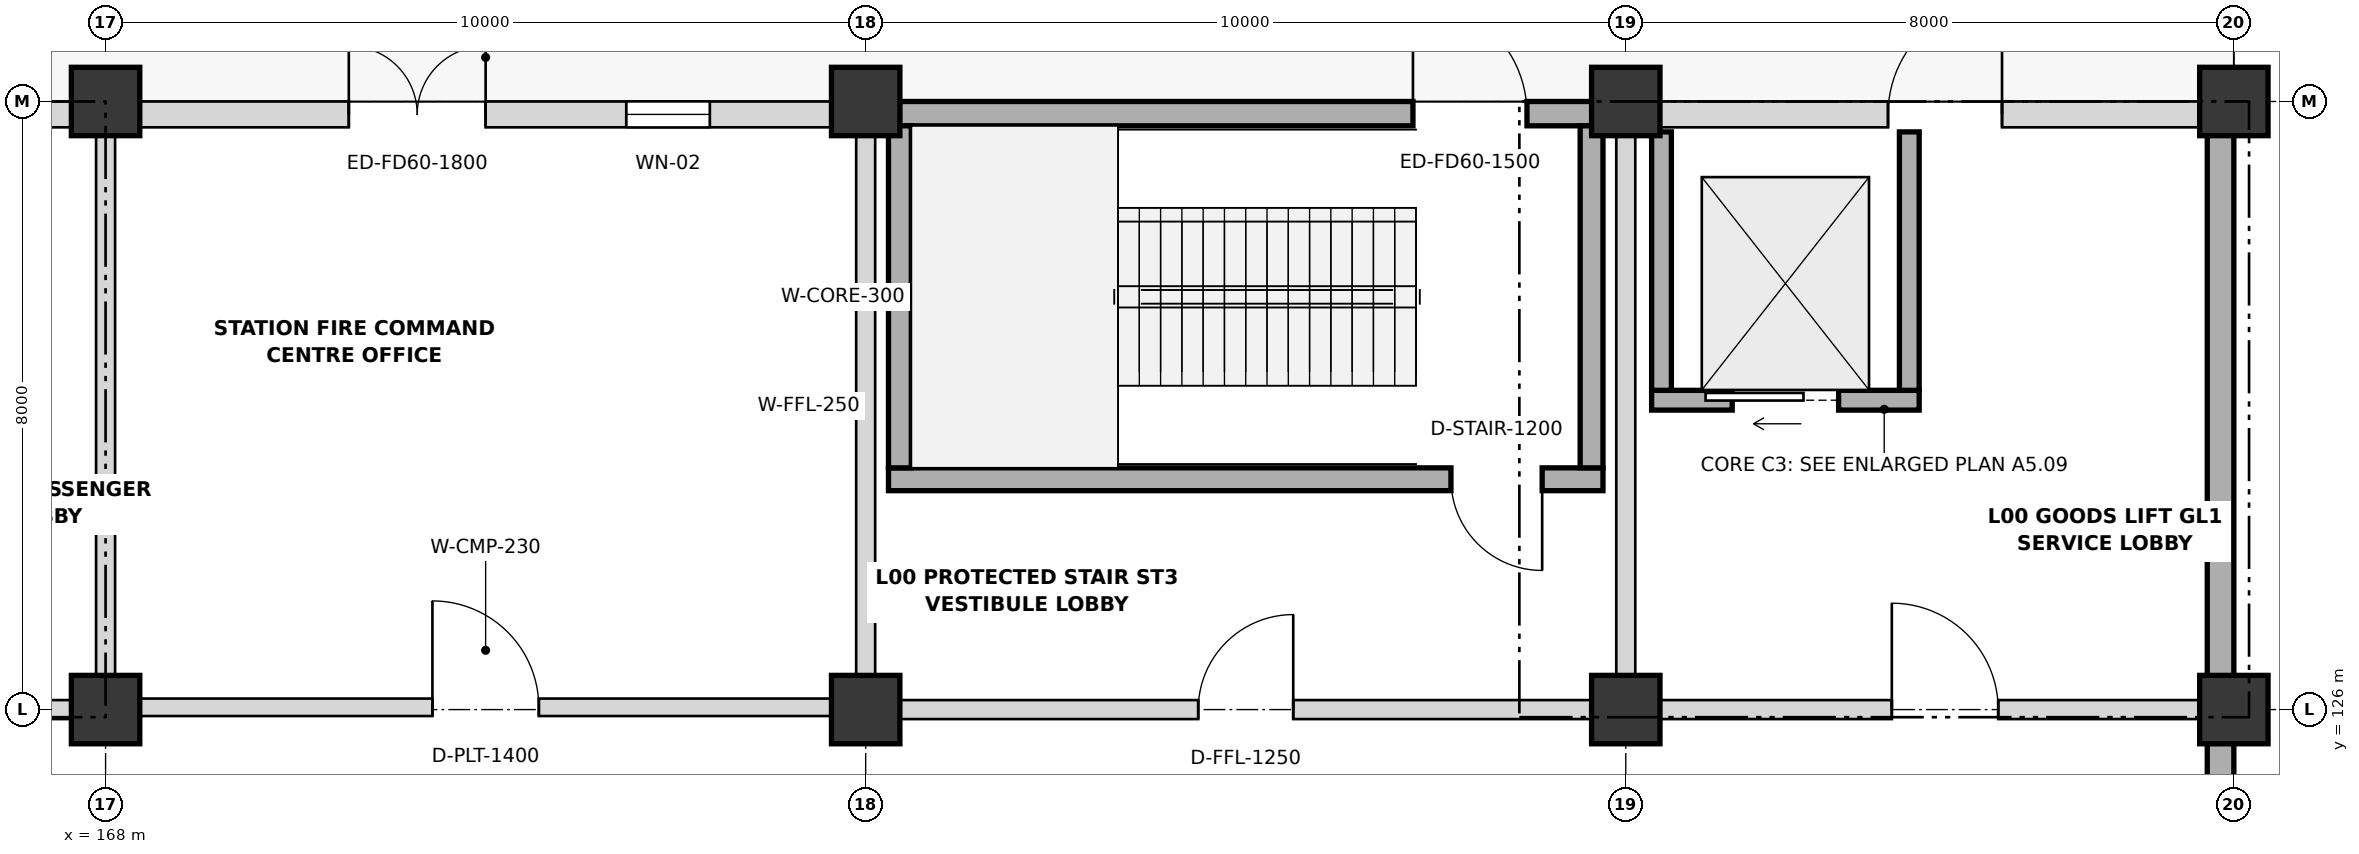
"""IFC4 building model, lengths in metres.
Left out: names, types, materials, properties, quantities, classifications, styles, units other than length and angle.
Written with IfcOpenShell. Run it as: python <this file> out.ifc"""

import sys

from ifc_helpers import new_model, si_unit, direction, frame, frame_2d, origin, origin_2d, place, context, subcontext, project, spatial, rectangle, extrude, element, fill, save


model = new_model("IFC4")
c1 = context("Model", 3, precision=1e-05, world=origin(), true_north=direction((0.0, 1.0)))
c2 = subcontext(c1, "Body", "Model", "MODEL_VIEW")
j1 = project(units=[si_unit("LENGTHUNIT", "METRE"), si_unit("PLANEANGLEUNIT", "RADIAN")], contexts=[c1])
p1 = place(None, origin())
s1 = spatial("IfcSite", under=j1, at=p1, CompositionType="ELEMENT")
p2 = place(p1, origin())
s2 = spatial("IfcBuilding", under=s1, at=p2, CompositionType="ELEMENT")
p3 = place(p2, origin())
s3 = spatial("IfcBuildingStorey", under=s2, at=p3, CompositionType="ELEMENT", Elevation=0.0)
for number, where, z_axis, x_axis in (
    (1, (168.0, 126.0, 0.0), (0.0, 0.0, 1.0), (1.0, 0.0, 0.0)),
    (2, (168.0, 134.0, 0.0), (0.0, 0.0, 1.0), (1.0, 0.0, 0.0)),
    (3, (178.0, 126.0, 0.0), (0.0, 0.0, 1.0), (1.0, 0.0, 0.0)),
    (4, (178.0, 134.0, 0.0), (0.0, 0.0, 1.0), (1.0, 0.0, 0.0)),
    (5, (188.0, 126.0, 0.0), (0.0, 0.0, 1.0), (1.0, 0.0, 0.0)),
    (6, (188.0, 134.0, 0.0), (0.0, 0.0, 1.0), (1.0, 0.0, 0.0)),
    (7, (196.0, 126.0, 0.0), (0.0, 0.0, 1.0), (1.0, 0.0, 0.0)),
    (8, (196.0, 134.0, 0.0), (0.0, 0.0, 1.0), (1.0, 0.0, 0.0)),
):
    element("IfcColumn", number, at=place(p3, frame(where, z_axis=z_axis, x_axis=x_axis)), inside=s3, PredefinedType="COLUMN", context=c2, shape_type="SweptSolid", body=[
        extrude(rectangle(XDim=0.9, YDim=0.9, at=origin_2d()), origin(), (0.0, 0.0, 1.0), 5.4),
    ])
p4 = place(p3, frame((195.825, 125.555, 0.0), z_axis=(0.0, 0.0, 1.0), x_axis=(0.0, -1.0, 0.0)))
e9 = element("IfcWall", 9, at=p4, inside=s3, PredefinedType="SOLIDWALL", context=c2, shape_type="SweptSolid", body=[
    extrude(rectangle(XDim=11.11, YDim=0.35, at=frame_2d((5.555, 0.0))), origin(), (0.0, 0.0, 1.0), 5.4),
])
p5 = place(p3, frame((195.825, 133.555, 0.0), z_axis=(0.0, 0.0, 1.0), x_axis=(0.0, -1.0, 0.0)))
e10 = element("IfcWall", 10, at=p5, inside=s3, PredefinedType="SOLIDWALL", context=c2, shape_type="SweptSolid", body=[
    extrude(rectangle(XDim=7.11, YDim=0.35, at=frame_2d((3.555, 0.0))), origin(), (0.0, 0.0, 1.0), 5.4),
])
p6 = place(p3, frame((158.445, 133.83, 0.0), z_axis=(0.0, 0.0, 1.0), x_axis=(1.0, 0.0, 0.0)))
e11 = element("IfcWall", 11, at=p6, inside=s3, PredefinedType="SOLIDWALL", context=c2, shape_type="SweptSolid", body=[
    extrude(rectangle(XDim=9.11, YDim=0.34, at=frame_2d((4.555, 0.0))), origin(), (0.0, 0.0, 1.0), 4.358),
])
p7 = place(p6, frame((6.005, 0.0, 0.0)))
e12 = element("IfcOpeningElement", 12, at=p7, cuts=e11, PredefinedType="OPENING", context=c2, shape_type="SweptSolid", body=[
    extrude(rectangle(XDim=1.5, YDim=2.25, at=frame_2d((0.75, 1.125))), frame((0.0, 0.18, 0.0), z_axis=(0.0, -1.0, 0.0), x_axis=(1.0, 0.0, 0.0)), (0.0, 0.0, 1.0), 0.36),
])
p8 = place(p3, frame((168.445, 133.83, 0.0), z_axis=(0.0, 0.0, 1.0), x_axis=(1.0, 0.0, 0.0)))
e13 = element("IfcWall", 13, at=p8, inside=s3, PredefinedType="SOLIDWALL", context=c2, shape_type="SweptSolid", body=[
    extrude(rectangle(XDim=9.11, YDim=0.34, at=frame_2d((4.555, 0.0))), origin(), (0.0, 0.0, 1.0), 4.358),
])
p9 = place(p8, frame((2.755, 0.0, 0.0)))
e14 = element("IfcOpeningElement", 14, at=p9, cuts=e13, PredefinedType="OPENING", context=c2, shape_type="SweptSolid", body=[
    extrude(rectangle(XDim=1.8, YDim=2.25, at=frame_2d((0.9, 1.125))), frame((0.0, 0.18, 0.0), z_axis=(0.0, -1.0, 0.0), x_axis=(1.0, 0.0, 0.0)), (0.0, 0.0, 1.0), 0.36),
])
p10 = place(p8, frame((6.405, 0.0, 1.15)))
e15 = element("IfcOpeningElement", 15, at=p10, cuts=e13, PredefinedType="OPENING", context=c2, shape_type="SweptSolid", body=[
    extrude(rectangle(XDim=1.1, YDim=1.15, at=frame_2d((0.55, 0.575))), frame((0.0, 0.18, 0.0), z_axis=(0.0, -1.0, 0.0), x_axis=(1.0, 0.0, 0.0)), (0.0, 0.0, 1.0), 0.36),
])
p11 = place(p3, frame((178.445, 133.84, 0.0), z_axis=(0.0, 0.0, 1.0), x_axis=(1.0, 0.0, 0.0)))
e16 = element("IfcWall", 16, at=p11, inside=s3, PredefinedType="SHEAR", context=c2, shape_type="SweptSolid", body=[
    extrude(rectangle(XDim=9.11, YDim=0.32, at=frame_2d((4.555, 0.0))), origin(), (0.0, 0.0, 1.0), 5.4),
])
p12 = place(p11, frame((6.755, 0.0, 0.0)))
e17 = element("IfcOpeningElement", 17, at=p12, cuts=e16, PredefinedType="OPENING", context=c2, shape_type="SweptSolid", body=[
    extrude(rectangle(XDim=1.5, YDim=2.25, at=frame_2d((0.75, 1.125))), frame((0.0, 0.17, 0.0), z_axis=(0.0, -1.0, 0.0), x_axis=(1.0, 0.0, 0.0)), (0.0, 0.0, 1.0), 0.34),
])
p13 = place(p3, frame((188.445, 133.83, 0.0), z_axis=(0.0, 0.0, 1.0), x_axis=(1.0, 0.0, 0.0)))
e18 = element("IfcWall", 18, at=p13, inside=s3, PredefinedType="SOLIDWALL", context=c2, shape_type="SweptSolid", body=[
    extrude(rectangle(XDim=7.11, YDim=0.34, at=frame_2d((3.555, 0.0))), origin(), (0.0, 0.0, 1.0), 4.358),
])
p14 = place(p13, frame((3.005, 0.0, 0.0)))
e19 = element("IfcOpeningElement", 19, at=p14, cuts=e18, PredefinedType="OPENING", context=c2, shape_type="SweptSolid", body=[
    extrude(rectangle(XDim=1.5, YDim=2.25, at=frame_2d((0.75, 1.125))), frame((0.0, 0.18, 0.0), z_axis=(0.0, -1.0, 0.0), x_axis=(1.0, 0.0, 0.0)), (0.0, 0.0, 1.0), 0.36),
])
p15 = place(p3, frame((187.7, 129.03, 0.0), z_axis=(0.0, 0.0, 1.0), x_axis=(-1.0, 0.0, 0.0)))
e20 = element("IfcWall", 20, at=p15, inside=s3, PredefinedType="SHEAR", context=c2, shape_type="SweptSolid", body=[
    extrude(rectangle(XDim=9.4, YDim=0.3, at=frame_2d((4.7, 0.0))), origin(), (0.0, 0.0, 1.0), 5.4),
])
p16 = place(p15, frame((0.8, 0.0, 0.0)))
e21 = element("IfcOpeningElement", 21, at=p16, cuts=e20, PredefinedType="OPENING", context=c2, shape_type="SweptSolid", body=[
    extrude(rectangle(XDim=1.2, YDim=2.15, at=frame_2d((0.6, 1.075))), frame((0.0, 0.16, 0.0), z_axis=(0.0, -1.0, 0.0), x_axis=(1.0, 0.0, 0.0)), (0.0, 0.0, 1.0), 0.32),
])
for number, where, z_axis, x_axis in (
    (22, (187.55, 133.68, 0.0), (0.0, 0.0, 1.0), (0.0, -1.0, 0.0)),
    (23, (178.45, 129.18, 0.0), (0.0, 0.0, 1.0), (0.0, 1.0, 0.0)),
):
    element("IfcWall", number, at=place(p3, frame(where, z_axis=z_axis, x_axis=x_axis)), inside=s3, PredefinedType="SHEAR", context=c2, shape_type="SweptSolid", body=[
        extrude(rectangle(XDim=4.5, YDim=0.3, at=frame_2d((2.25, 0.0))), origin(), (0.0, 0.0, 1.0), 5.4),
    ])
p17 = place(p3, frame((188.34, 130.07, 0.0), z_axis=(0.0, 0.0, 1.0), x_axis=(1.0, 0.0, 0.0)))
e24 = element("IfcWall", 24, at=p17, inside=s3, PredefinedType="SHEAR", context=c2, shape_type="SweptSolid", body=[
    extrude(rectangle(XDim=3.52, YDim=0.26, at=frame_2d((1.76, 0.0))), origin(), (0.0, 0.0, 1.0), 5.4),
])
p18 = place(p17, frame((1.06, 0.0, 0.0)))
e25 = element("IfcOpeningElement", 25, at=p18, cuts=e24, PredefinedType="OPENING", context=c2, shape_type="SweptSolid", body=[
    extrude(rectangle(XDim=1.4, YDim=2.2, at=frame_2d((0.7, 1.1))), frame((0.0, 0.14, 0.0), z_axis=(0.0, -1.0, 0.0), x_axis=(1.0, 0.0, 0.0)), (0.0, 0.0, 1.0), 0.28),
])
for number, where, z_axis, x_axis in (
    (26, (188.47, 130.2, 0.0), (0.0, 0.0, 1.0), (0.0, 1.0, 0.0)),
    (27, (191.73, 130.2, 0.0), (0.0, 0.0, 1.0), (0.0, 1.0, 0.0)),
):
    element("IfcWall", number, at=place(p3, frame(where, z_axis=z_axis, x_axis=x_axis)), inside=s3, PredefinedType="SHEAR", context=c2, shape_type="SweptSolid", body=[
        extrude(rectangle(XDim=3.4, YDim=0.26, at=frame_2d((1.7, 0.0))), origin(), (0.0, 0.0, 1.0), 5.4),
    ])
p19 = place(p3, frame((158.455, 126.0, 0.0), z_axis=(0.0, 0.0, 1.0), x_axis=(1.0, 0.0, 0.0)))
e28 = element("IfcWall", 28, at=p19, inside=s3, PredefinedType="PARTITIONING", context=c2, shape_type="SweptSolid", body=[
    extrude(rectangle(XDim=9.09, YDim=0.25, at=frame_2d((4.545, 0.0))), origin(), (0.0, 0.0, 1.0), 4.258),
])
p20 = place(p19, frame((1.72, 0.0, 0.0)))
e29 = element("IfcOpeningElement", 29, at=p20, cuts=e28, PredefinedType="OPENING", context=c2, shape_type="SweptSolid", body=[
    extrude(rectangle(XDim=1.25, YDim=2.15, at=frame_2d((0.625, 1.075))), frame((0.0, 0.135, 0.0), z_axis=(0.0, -1.0, 0.0), x_axis=(1.0, 0.0, 0.0)), (0.0, 0.0, 1.0), 0.27),
])
p21 = place(p19, frame((6.195, 0.0, 0.0)))
e30 = element("IfcOpeningElement", 30, at=p21, cuts=e28, PredefinedType="OPENING", context=c2, shape_type="SweptSolid", body=[
    extrude(rectangle(XDim=1.1, YDim=2.15, at=frame_2d((0.55, 1.075))), frame((0.0, 0.135, 0.0), z_axis=(0.0, -1.0, 0.0), x_axis=(1.0, 0.0, 0.0)), (0.0, 0.0, 1.0), 0.27),
])
p22 = place(p3, frame((178.455, 126.0, 0.0), z_axis=(0.0, 0.0, 1.0), x_axis=(1.0, 0.0, 0.0)))
e31 = element("IfcWall", 31, at=p22, inside=s3, PredefinedType="PARTITIONING", context=c2, shape_type="SweptSolid", body=[
    extrude(rectangle(XDim=9.09, YDim=0.25, at=frame_2d((4.545, 0.0))), origin(), (0.0, 0.0, 1.0), 4.258),
])
p23 = place(p22, frame((3.92, 0.0, 0.0)))
e32 = element("IfcOpeningElement", 32, at=p23, cuts=e31, PredefinedType="OPENING", context=c2, shape_type="SweptSolid", body=[
    extrude(rectangle(XDim=1.25, YDim=2.15, at=frame_2d((0.625, 1.075))), frame((0.0, 0.135, 0.0), z_axis=(0.0, -1.0, 0.0), x_axis=(1.0, 0.0, 0.0)), (0.0, 0.0, 1.0), 0.27),
])
p24 = place(p3, frame((188.455, 126.0, 0.0), z_axis=(0.0, 0.0, 1.0), x_axis=(1.0, 0.0, 0.0)))
e33 = element("IfcWall", 33, at=p24, inside=s3, PredefinedType="PARTITIONING", context=c2, shape_type="SweptSolid", body=[
    extrude(rectangle(XDim=7.09, YDim=0.25, at=frame_2d((3.545, 0.0))), origin(), (0.0, 0.0, 1.0), 4.258),
])
p25 = place(p24, frame((3.045, 0.0, 0.0)))
e34 = element("IfcOpeningElement", 34, at=p25, cuts=e33, PredefinedType="OPENING", context=c2, shape_type="SweptSolid", body=[
    extrude(rectangle(XDim=1.4, YDim=2.2, at=frame_2d((0.7, 1.1))), frame((0.0, 0.135, 0.0), z_axis=(0.0, -1.0, 0.0), x_axis=(1.0, 0.0, 0.0)), (0.0, 0.0, 1.0), 0.27),
])
for number, where, z_axis, x_axis in (
    (35, (168.0, 126.455, 0.0), (0.0, 0.0, 1.0), (0.0, 1.0, 0.0)),
    (36, (178.0, 126.455, 0.0), (0.0, 0.0, 1.0), (0.0, 1.0, 0.0)),
    (37, (188.0, 126.455, 0.0), (0.0, 0.0, 1.0), (0.0, 1.0, 0.0)),
):
    element("IfcWall", number, at=place(p3, frame(where, z_axis=z_axis, x_axis=x_axis)), inside=s3, PredefinedType="PARTITIONING", context=c2, shape_type="SweptSolid", body=[
        extrude(rectangle(XDim=7.09, YDim=0.25, at=frame_2d((3.545, 0.0))), origin(), (0.0, 0.0, 1.0), 4.358),
    ])
p26 = place(p3, frame((168.3, 126.03, 0.0), z_axis=(0.0, 0.0, 1.0), x_axis=(1.0, 0.0, 0.0)))
e38 = element("IfcWall", 38, at=p26, inside=s3, PredefinedType="PARTITIONING", context=c2, shape_type="SweptSolid", body=[
    extrude(rectangle(XDim=9.4, YDim=0.23, at=frame_2d((4.7, 0.0))), origin(), (0.0, 0.0, 1.0), 4.258),
])
p27 = place(p26, frame((4.0, 0.0, 0.0)))
e39 = element("IfcOpeningElement", 39, at=p27, cuts=e38, PredefinedType="OPENING", context=c2, shape_type="SweptSolid", body=[
    extrude(rectangle(XDim=1.4, YDim=2.2, at=frame_2d((0.7, 1.1))), frame((0.0, 0.125, 0.0), z_axis=(0.0, -1.0, 0.0), x_axis=(1.0, 0.0, 0.0)), (0.0, 0.0, 1.0), 0.25),
])
p28 = place(p9, origin())
e40 = element("IfcDoor", 40, at=p28, inside=s3, OperationType="DOUBLE_DOOR_SINGLE_SWING", PredefinedType="DOOR", context=c2, shape_type="SweptSolid", body=[
    extrude(rectangle(XDim=1.8, YDim=2.25, at=frame_2d((0.9, 1.125))), frame((0.0, 0.025, 0.0), z_axis=(0.0, -1.0, 0.0), x_axis=(1.0, 0.0, 0.0)), (0.0, 0.0, 1.0), 0.05),
])
fill(e14, e40)
p29 = place(p10, origin())
e41 = element("IfcWindow", 41, at=p29, inside=s3, PartitioningType="SINGLE_PANEL", PredefinedType="WINDOW", context=c2, shape_type="SweptSolid", body=[
    extrude(rectangle(XDim=1.1, YDim=1.15, at=frame_2d((0.55, 0.575))), frame((0.0, 0.03, 0.0), z_axis=(0.0, -1.0, 0.0), x_axis=(1.0, 0.0, 0.0)), (0.0, 0.0, 1.0), 0.06),
])
fill(e15, e41)
p30 = place(p12, origin())
e42 = element("IfcDoor", 42, at=p30, inside=s3, OperationType="SINGLE_SWING_LEFT", PredefinedType="DOOR", context=c2, shape_type="SweptSolid", body=[
    extrude(rectangle(XDim=1.5, YDim=2.25, at=frame_2d((0.75, 1.125))), frame((0.0, 0.025, 0.0), z_axis=(0.0, -1.0, 0.0), x_axis=(1.0, 0.0, 0.0)), (0.0, 0.0, 1.0), 0.05),
])
fill(e17, e42)
p31 = place(p14, origin())
e43 = element("IfcDoor", 43, at=p31, inside=s3, OperationType="SINGLE_SWING_RIGHT", PredefinedType="DOOR", context=c2, shape_type="SweptSolid", body=[
    extrude(rectangle(XDim=1.5, YDim=2.25, at=frame_2d((0.75, 1.125))), frame((0.0, 0.025, 0.0), z_axis=(0.0, -1.0, 0.0), x_axis=(1.0, 0.0, 0.0)), (0.0, 0.0, 1.0), 0.05),
])
fill(e19, e43)
p32 = place(p16, origin())
e44 = element("IfcDoor", 44, at=p32, inside=s3, OperationType="SINGLE_SWING_LEFT", PredefinedType="DOOR", context=c2, shape_type="SweptSolid", body=[
    extrude(rectangle(XDim=1.2, YDim=2.15, at=frame_2d((0.6, 1.075))), frame((0.0, 0.025, 0.0), z_axis=(0.0, -1.0, 0.0), x_axis=(1.0, 0.0, 0.0)), (0.0, 0.0, 1.0), 0.05),
])
fill(e21, e44)
p33 = place(p18, origin())
e45 = element("IfcDoor", 45, at=p33, inside=s3, OperationType="SLIDING_TO_LEFT", PredefinedType="DOOR", context=c2, shape_type="SweptSolid", body=[
    extrude(rectangle(XDim=1.4, YDim=2.2, at=frame_2d((0.7, 1.1))), frame((0.0, 0.025, 0.0), z_axis=(0.0, -1.0, 0.0), x_axis=(1.0, 0.0, 0.0)), (0.0, 0.0, 1.0), 0.05),
])
fill(e25, e45)
p34 = place(p23, origin())
e46 = element("IfcDoor", 46, at=p34, inside=s3, OperationType="SINGLE_SWING_RIGHT", PredefinedType="DOOR", context=c2, shape_type="SweptSolid", body=[
    extrude(rectangle(XDim=1.25, YDim=2.15, at=frame_2d((0.625, 1.075))), frame((0.0, 0.025, 0.0), z_axis=(0.0, -1.0, 0.0), x_axis=(1.0, 0.0, 0.0)), (0.0, 0.0, 1.0), 0.05),
])
fill(e32, e46)
p35 = place(p25, origin())
e47 = element("IfcDoor", 47, at=p35, inside=s3, OperationType="SINGLE_SWING_LEFT", PredefinedType="DOOR", context=c2, shape_type="SweptSolid", body=[
    extrude(rectangle(XDim=1.4, YDim=2.2, at=frame_2d((0.7, 1.1))), frame((0.0, 0.025, 0.0), z_axis=(0.0, -1.0, 0.0), x_axis=(1.0, 0.0, 0.0)), (0.0, 0.0, 1.0), 0.05),
])
fill(e34, e47)
p36 = place(p27, origin())
e48 = element("IfcDoor", 48, at=p36, inside=s3, OperationType="SINGLE_SWING_LEFT", PredefinedType="DOOR", context=c2, shape_type="SweptSolid", body=[
    extrude(rectangle(XDim=1.4, YDim=2.2, at=frame_2d((0.7, 1.1))), frame((0.0, 0.025, 0.0), z_axis=(0.0, -1.0, 0.0), x_axis=(1.0, 0.0, 0.0)), (0.0, 0.0, 1.0), 0.05),
])
fill(e39, e48)
save(model, sys.argv[1])
